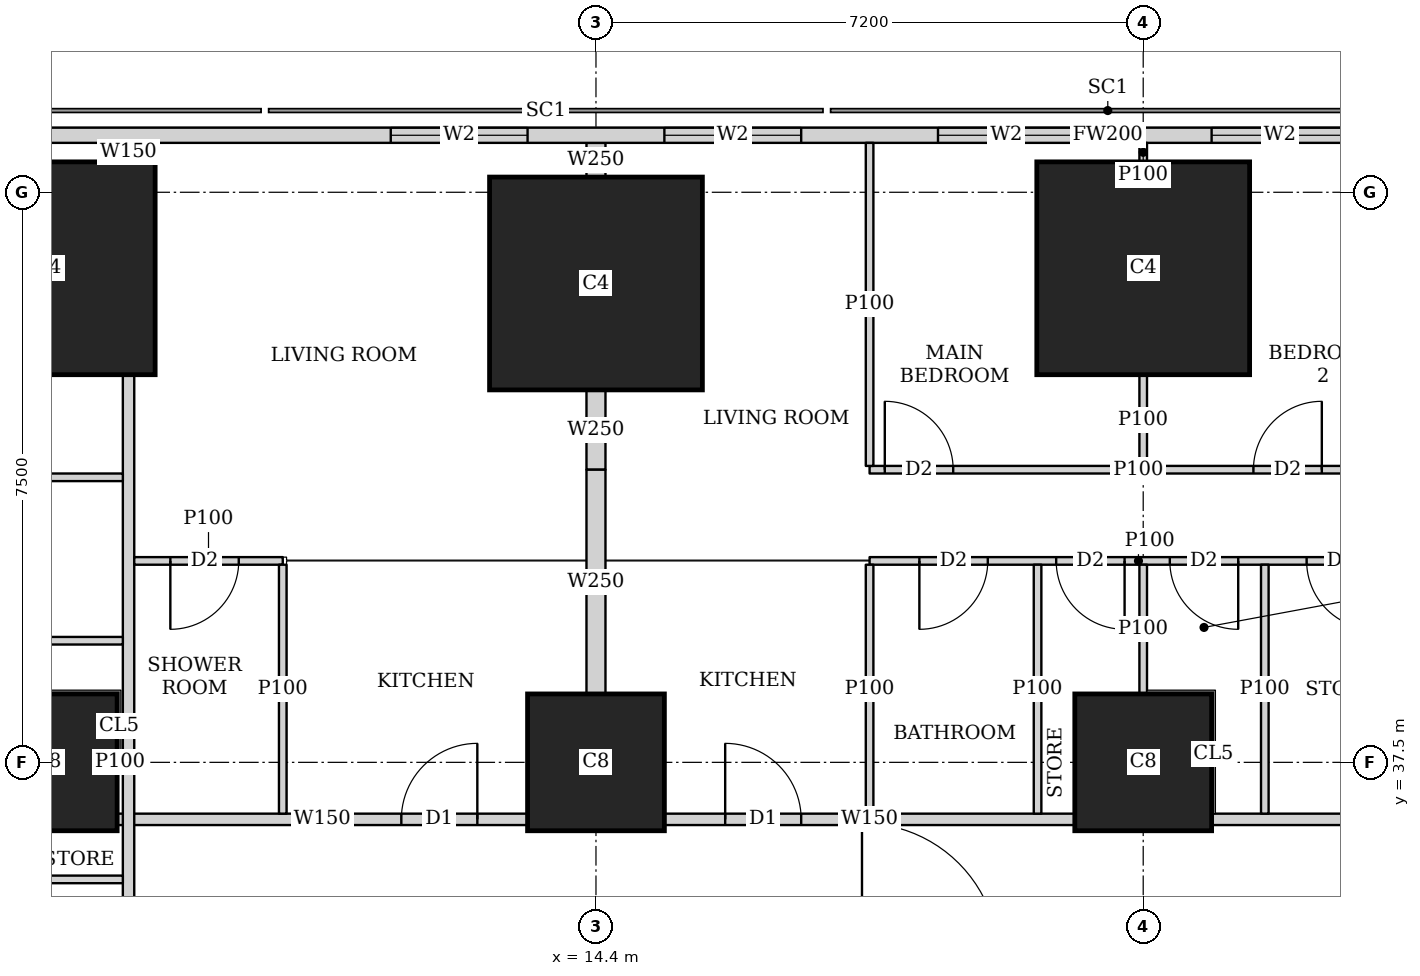
"""IFC4 building model, lengths in metres.
Left out: names, types, materials, properties, quantities, classifications, styles, units other than length and angle.
Written with IfcOpenShell. Run it as: python <this file> out.ifc"""

import sys

from ifc_helpers import new_model, si_unit, direction, frame, frame_2d, origin, origin_2d, place, context, subcontext, project, spatial, rectangle, extrude, element, fill, save


model = new_model("IFC4")
c1 = context("Model", 3, precision=1e-05, world=origin(), true_north=direction((0.0, 1.0)))
c2 = subcontext(c1, "Body", "Model", "MODEL_VIEW")
j1 = project(units=[si_unit("LENGTHUNIT", "METRE"), si_unit("PLANEANGLEUNIT", "RADIAN")], contexts=[c1])
p1 = place(None, origin())
s1 = spatial("IfcSite", under=j1, at=p1, CompositionType="ELEMENT")
p2 = place(p1, origin())
s2 = spatial("IfcBuilding", under=s1, at=p2, CompositionType="ELEMENT")
p3 = place(p2, frame((0.0, 0.0, 31.25)))
s3 = spatial("IfcBuildingStorey", under=s2, at=p3, CompositionType="ELEMENT", Elevation=31.25)
for number, where, z_axis, x_axis in (
    (1, (7.2, 37.5, 0.0), (0.0, 0.0, 1.0), (1.0, 0.0, 0.0)),
    (2, (14.4, 37.5, 0.0), (0.0, 0.0, 1.0), (1.0, 0.0, 0.0)),
    (3, (21.6, 37.5, 0.0), (0.0, 0.0, 1.0), (1.0, 0.0, 0.0)),
):
    element("IfcColumn", number, at=place(p3, frame(where, z_axis=z_axis, x_axis=x_axis)), inside=s3, PredefinedType="COLUMN", context=c2, shape_type="SweptSolid", body=[
        extrude(rectangle(XDim=1.8, YDim=1.8, at=origin_2d()), origin(), (0.0, 0.0, 1.0), 3.75),
    ])
for number, where, z_axis, x_axis in (
    (4, (7.2, 44.0, 0.0), (0.0, 0.0, 1.0), (1.0, 0.0, 0.0)),
    (5, (14.4, 43.8, 0.0), (0.0, 0.0, 1.0), (1.0, 0.0, 0.0)),
    (6, (21.6, 44.0, 0.0), (0.0, 0.0, 1.0), (1.0, 0.0, 0.0)),
):
    element("IfcColumn", number, at=place(p3, frame(where, z_axis=z_axis, x_axis=x_axis)), inside=s3, PredefinedType="COLUMN", context=c2, shape_type="SweptSolid", body=[
        extrude(rectangle(XDim=2.8, YDim=2.8, at=origin_2d()), origin(), (0.0, 0.0, 1.0), 3.75),
    ])
p4 = place(p3, frame((40.106, 45.75, 0.0), z_axis=(0.0, 0.0, 1.0), x_axis=(-1.0, 0.0, 0.0)))
e7 = element("IfcWall", 7, at=p4, inside=s3, PredefinedType="SOLIDWALL", context=c2, shape_type="SweptSolid", body=[
    extrude(rectangle(XDim=37.943, YDim=0.2, at=frame_2d((18.971, 0.0))), origin(), (0.0, 0.0, 1.0), 3.5),
])
p5 = place(p4, frame((8.606, 0.0, 0.9)))
e8 = element("IfcOpeningElement", 8, at=p5, cuts=e7, PredefinedType="OPENING", context=c2, shape_type="SweptSolid", body=[
    extrude(rectangle(XDim=1.8, YDim=1.5, at=frame_2d((0.9, 0.75))), frame((0.0, 0.11, 0.0), z_axis=(0.0, -1.0, 0.0), x_axis=(1.0, 0.0, 0.0)), (0.0, 0.0, 1.0), 0.22),
])
p6 = place(p4, frame((12.206, 0.0, 0.9)))
e9 = element("IfcOpeningElement", 9, at=p6, cuts=e7, PredefinedType="OPENING", context=c2, shape_type="SweptSolid", body=[
    extrude(rectangle(XDim=1.8, YDim=1.5, at=frame_2d((0.9, 0.75))), frame((0.0, 0.11, 0.0), z_axis=(0.0, -1.0, 0.0), x_axis=(1.0, 0.0, 0.0)), (0.0, 0.0, 1.0), 0.22),
])
p7 = place(p4, frame((15.806, 0.0, 0.9)))
e10 = element("IfcOpeningElement", 10, at=p7, cuts=e7, PredefinedType="OPENING", context=c2, shape_type="SweptSolid", body=[
    extrude(rectangle(XDim=1.8, YDim=1.5, at=frame_2d((0.9, 0.75))), frame((0.0, 0.11, 0.0), z_axis=(0.0, -1.0, 0.0), x_axis=(1.0, 0.0, 0.0)), (0.0, 0.0, 1.0), 0.22),
])
p8 = place(p4, frame((19.406, 0.0, 0.9)))
e11 = element("IfcOpeningElement", 11, at=p8, cuts=e7, PredefinedType="OPENING", context=c2, shape_type="SweptSolid", body=[
    extrude(rectangle(XDim=1.8, YDim=1.5, at=frame_2d((0.9, 0.75))), frame((0.0, 0.11, 0.0), z_axis=(0.0, -1.0, 0.0), x_axis=(1.0, 0.0, 0.0)), (0.0, 0.0, 1.0), 0.22),
])
p9 = place(p4, frame((23.006, 0.0, 0.9)))
e12 = element("IfcOpeningElement", 12, at=p9, cuts=e7, PredefinedType="OPENING", context=c2, shape_type="SweptSolid", body=[
    extrude(rectangle(XDim=1.8, YDim=1.5, at=frame_2d((0.9, 0.75))), frame((0.0, 0.11, 0.0), z_axis=(0.0, -1.0, 0.0), x_axis=(1.0, 0.0, 0.0)), (0.0, 0.0, 1.0), 0.22),
])
p10 = place(p4, frame((26.606, 0.0, 0.9)))
e13 = element("IfcOpeningElement", 13, at=p10, cuts=e7, PredefinedType="OPENING", context=c2, shape_type="SweptSolid", body=[
    extrude(rectangle(XDim=1.8, YDim=1.5, at=frame_2d((0.9, 0.75))), frame((0.0, 0.11, 0.0), z_axis=(0.0, -1.0, 0.0), x_axis=(1.0, 0.0, 0.0)), (0.0, 0.0, 1.0), 0.22),
])
p11 = place(p3, frame((8.25, 2.426, 0.0), z_axis=(0.0, 0.0, 1.0), x_axis=(0.0, 1.0, 0.0)))
e14 = element("IfcWall", 14, at=p11, inside=s3, PredefinedType="SOLIDWALL", context=c2, shape_type="SweptSolid", body=[
    extrude(rectangle(XDim=40.173, YDim=0.15, at=frame_2d((20.086, 0.0))), origin(), (0.0, 0.0, 1.0), 3.5),
])
p12 = place(p11, frame((14.161, 0.0, 0.0)))
e15 = element("IfcOpeningElement", 15, at=p12, cuts=e14, PredefinedType="OPENING", context=c2, shape_type="SweptSolid", body=[
    extrude(rectangle(XDim=1.0, YDim=2.1, at=frame_2d((0.5, 1.05))), frame((0.0, 0.085, 0.0), z_axis=(0.0, -1.0, 0.0), x_axis=(1.0, 0.0, 0.0)), (0.0, 0.0, 1.0), 0.17),
])
p13 = place(p11, frame((17.487, 0.0, 0.0)))
e16 = element("IfcOpeningElement", 16, at=p13, cuts=e14, PredefinedType="OPENING", context=c2, shape_type="SweptSolid", body=[
    extrude(rectangle(XDim=1.0, YDim=2.1, at=frame_2d((0.5, 1.05))), frame((0.0, 0.085, 0.0), z_axis=(0.0, -1.0, 0.0), x_axis=(1.0, 0.0, 0.0)), (0.0, 0.0, 1.0), 0.17),
])
p14 = place(p11, frame((29.161, 0.0, 0.0)))
e17 = element("IfcOpeningElement", 17, at=p14, cuts=e14, PredefinedType="OPENING", context=c2, shape_type="SweptSolid", body=[
    extrude(rectangle(XDim=1.0, YDim=2.1, at=frame_2d((0.5, 1.05))), frame((0.0, 0.085, 0.0), z_axis=(0.0, -1.0, 0.0), x_axis=(1.0, 0.0, 0.0)), (0.0, 0.0, 1.0), 0.17),
])
p15 = place(p3, frame((8.25, 45.401, 0.0), z_axis=(0.0, 0.0, 1.0), x_axis=(0.0, 1.0, 0.0)))
e18 = element("IfcWall", 18, at=p15, inside=s3, PredefinedType="SOLIDWALL", context=c2, shape_type="SweptSolid", body=[
    extrude(rectangle(XDim=0.249, YDim=0.15, at=frame_2d((0.125, 0.0))), origin(), (0.0, 0.0, 1.0), 3.5),
])
p16 = place(p3, frame((8.1, 36.75, 0.0), z_axis=(0.0, 0.0, 1.0), x_axis=(1.0, 0.0, 0.0)))
e19 = element("IfcWall", 19, at=p16, inside=s3, PredefinedType="SOLIDWALL", context=c2, shape_type="SweptSolid", body=[
    extrude(rectangle(XDim=5.399, YDim=0.15, at=frame_2d((2.699, 0.0))), origin(), (0.0, 0.0, 1.0), 3.5),
])
p17 = place(p16, frame((3.739, 0.0, 0.0)))
e20 = element("IfcOpeningElement", 20, at=p17, cuts=e19, PredefinedType="OPENING", context=c2, shape_type="SweptSolid", body=[
    extrude(rectangle(XDim=1.0, YDim=2.1, at=frame_2d((0.5, 1.05))), frame((0.0, 0.085, 0.0), z_axis=(0.0, -1.0, 0.0), x_axis=(1.0, 0.0, 0.0)), (0.0, 0.0, 1.0), 0.17),
])
p18 = place(p3, frame((15.301, 36.75, 0.0), z_axis=(0.0, 0.0, 1.0), x_axis=(1.0, 0.0, 0.0)))
e21 = element("IfcWall", 21, at=p18, inside=s3, PredefinedType="SOLIDWALL", context=c2, shape_type="SweptSolid", body=[
    extrude(rectangle(XDim=5.398, YDim=0.15, at=frame_2d((2.699, 0.0))), origin(), (0.0, 0.0, 1.0), 3.5),
])
p19 = place(p18, frame((0.799, 0.0, 0.0)))
e22 = element("IfcOpeningElement", 22, at=p19, cuts=e21, PredefinedType="OPENING", context=c2, shape_type="SweptSolid", body=[
    extrude(rectangle(XDim=1.0, YDim=2.1, at=frame_2d((0.5, 1.05))), frame((0.0, 0.085, 0.0), z_axis=(0.0, -1.0, 0.0), x_axis=(1.0, 0.0, 0.0)), (0.0, 0.0, 1.0), 0.17),
])
p20 = place(p3, frame((22.501, 36.75, 0.0), z_axis=(0.0, 0.0, 1.0), x_axis=(1.0, 0.0, 0.0)))
e23 = element("IfcWall", 23, at=p20, inside=s3, PredefinedType="SOLIDWALL", context=c2, shape_type="SweptSolid", body=[
    extrude(rectangle(XDim=5.398, YDim=0.15, at=frame_2d((2.699, 0.0))), origin(), (0.0, 0.0, 1.0), 3.5),
])
p21 = place(p20, frame((3.599, 0.0, 0.0)))
e24 = element("IfcOpeningElement", 24, at=p21, cuts=e23, PredefinedType="OPENING", context=c2, shape_type="SweptSolid", body=[
    extrude(rectangle(XDim=1.0, YDim=2.1, at=frame_2d((0.5, 1.05))), frame((0.0, 0.085, 0.0), z_axis=(0.0, -1.0, 0.0), x_axis=(1.0, 0.0, 0.0)), (0.0, 0.0, 1.0), 0.17),
])
p22 = place(p3, frame((8.101, 37.5, 0.0), z_axis=(0.0, 0.0, 1.0), x_axis=(1.0, 0.0, 0.0)))
e25 = element("IfcWall", 25, at=p22, inside=s3, PredefinedType="PARTITIONING", context=c2, shape_type="SweptSolid", body=[
    extrude(rectangle(XDim=0.074, YDim=0.1, at=frame_2d((0.037, 0.0))), origin(), (0.0, 0.0, 1.0), 3.5),
])
for number, where, z_axis, x_axis in (
    (26, (4.9, 41.25, 0.0), (0.0, 0.0, 1.0), (1.0, 0.0, 0.0)),
    (27, (4.9, 35.96, 0.0), (0.0, 0.0, 1.0), (1.0, 0.0, 0.0)),
    (28, (4.9, 39.1, 0.0), (0.0, 0.0, 1.0), (1.0, 0.0, 0.0)),
):
    element("IfcWall", number, at=place(p3, frame(where, z_axis=z_axis, x_axis=x_axis)), inside=s3, PredefinedType="PARTITIONING", context=c2, shape_type="SweptSolid", body=[
        extrude(rectangle(XDim=3.275, YDim=0.1, at=frame_2d((1.638, 0.0))), origin(), (0.0, 0.0, 1.0), 3.5),
    ])
p23 = place(p3, frame((8.325, 40.15, 0.0), z_axis=(0.0, 0.0, 1.0), x_axis=(1.0, 0.0, 0.0)))
e29 = element("IfcWall", 29, at=p23, inside=s3, PredefinedType="PARTITIONING", context=c2, shape_type="SweptSolid", body=[
    extrude(rectangle(XDim=1.954, YDim=0.1, at=frame_2d((0.977, 0.0))), origin(), (0.0, 0.0, 1.0), 3.5),
])
p24 = place(p23, frame((0.475, 0.0, 0.0)))
e30 = element("IfcOpeningElement", 30, at=p24, cuts=e29, PredefinedType="OPENING", context=c2, shape_type="SweptSolid", body=[
    extrude(rectangle(XDim=0.9, YDim=2.1, at=frame_2d((0.45, 1.05))), frame((0.0, 0.06, 0.0), z_axis=(0.0, -1.0, 0.0), x_axis=(1.0, 0.0, 0.0)), (0.0, 0.0, 1.0), 0.12),
])
p25 = place(p3, frame((10.279, 36.825, 0.0), z_axis=(0.0, 0.0, 1.0), x_axis=(0.0, 1.0, 0.0)))
e31 = element("IfcWall", 31, at=p25, inside=s3, PredefinedType="PARTITIONING", context=c2, shape_type="SweptSolid", body=[
    extrude(rectangle(XDim=3.275, YDim=0.1, at=frame_2d((1.638, 0.0))), origin(), (0.0, 0.0, 1.0), 3.5),
])
p26 = place(p3, frame((18.0, 41.35, 0.0), z_axis=(0.0, 0.0, 1.0), x_axis=(1.0, 0.0, 0.0)))
e32 = element("IfcWall", 32, at=p26, inside=s3, PredefinedType="PARTITIONING", context=c2, shape_type="SweptSolid", body=[
    extrude(rectangle(XDim=7.075, YDim=0.1, at=frame_2d((3.538, 0.0))), origin(), (0.0, 0.0, 1.0), 3.5),
])
p27 = place(p26, frame((0.2, 0.0, 0.0)))
e33 = element("IfcOpeningElement", 33, at=p27, cuts=e32, PredefinedType="OPENING", context=c2, shape_type="SweptSolid", body=[
    extrude(rectangle(XDim=0.9, YDim=2.1, at=frame_2d((0.45, 1.05))), frame((0.0, 0.06, 0.0), z_axis=(0.0, -1.0, 0.0), x_axis=(1.0, 0.0, 0.0)), (0.0, 0.0, 1.0), 0.12),
])
p28 = place(p26, frame((5.05, 0.0, 0.0)))
e34 = element("IfcOpeningElement", 34, at=p28, cuts=e32, PredefinedType="OPENING", context=c2, shape_type="SweptSolid", body=[
    extrude(rectangle(XDim=0.9, YDim=2.1, at=frame_2d((0.45, 1.05))), frame((0.0, 0.06, 0.0), z_axis=(0.0, -1.0, 0.0), x_axis=(1.0, 0.0, 0.0)), (0.0, 0.0, 1.0), 0.12),
])
p29 = place(p3, frame((18.0, 40.15, 0.0), z_axis=(0.0, 0.0, 1.0), x_axis=(1.0, 0.0, 0.0)))
e35 = element("IfcWall", 35, at=p29, inside=s3, PredefinedType="PARTITIONING", context=c2, shape_type="SweptSolid", body=[
    extrude(rectangle(XDim=7.075, YDim=0.1, at=frame_2d((3.538, 0.0))), origin(), (0.0, 0.0, 1.0), 3.5),
])
p30 = place(p29, frame((0.655, 0.0, 0.0)))
e36 = element("IfcOpeningElement", 36, at=p30, cuts=e35, PredefinedType="OPENING", context=c2, shape_type="SweptSolid", body=[
    extrude(rectangle(XDim=0.9, YDim=2.1, at=frame_2d((0.45, 1.05))), frame((0.0, 0.06, 0.0), z_axis=(0.0, -1.0, 0.0), x_axis=(1.0, 0.0, 0.0)), (0.0, 0.0, 1.0), 0.12),
])
p31 = place(p29, frame((3.95, 0.0, 0.0)))
e37 = element("IfcOpeningElement", 37, at=p31, cuts=e35, PredefinedType="OPENING", context=c2, shape_type="SweptSolid", body=[
    extrude(rectangle(XDim=0.9, YDim=2.1, at=frame_2d((0.45, 1.05))), frame((0.0, 0.06, 0.0), z_axis=(0.0, -1.0, 0.0), x_axis=(1.0, 0.0, 0.0)), (0.0, 0.0, 1.0), 0.12),
])
p32 = place(p29, frame((2.455, 0.0, 0.0)))
e38 = element("IfcOpeningElement", 38, at=p32, cuts=e35, PredefinedType="OPENING", context=c2, shape_type="SweptSolid", body=[
    extrude(rectangle(XDim=0.9, YDim=2.1, at=frame_2d((0.45, 1.05))), frame((0.0, 0.06, 0.0), z_axis=(0.0, -1.0, 0.0), x_axis=(1.0, 0.0, 0.0)), (0.0, 0.0, 1.0), 0.12),
])
p33 = place(p29, frame((5.75, 0.0, 0.0)))
e39 = element("IfcOpeningElement", 39, at=p33, cuts=e35, PredefinedType="OPENING", context=c2, shape_type="SweptSolid", body=[
    extrude(rectangle(XDim=0.9, YDim=2.1, at=frame_2d((0.45, 1.05))), frame((0.0, 0.06, 0.0), z_axis=(0.0, -1.0, 0.0), x_axis=(1.0, 0.0, 0.0)), (0.0, 0.0, 1.0), 0.12),
])
p34 = place(p3, frame((18.0, 41.4, 0.0), z_axis=(0.0, 0.0, 1.0), x_axis=(0.0, 1.0, 0.0)))
e40 = element("IfcWall", 40, at=p34, inside=s3, PredefinedType="PARTITIONING", context=c2, shape_type="SweptSolid", body=[
    extrude(rectangle(XDim=4.25, YDim=0.1, at=frame_2d((2.125, 0.0))), origin(), (0.0, 0.0, 1.0), 2.05),
])
p35 = place(p3, frame((21.6, 41.4, 0.0), z_axis=(0.0, 0.0, 1.0), x_axis=(0.0, 1.0, 0.0)))
e41 = element("IfcWall", 41, at=p35, inside=s3, PredefinedType="PARTITIONING", context=c2, shape_type="SweptSolid", body=[
    extrude(rectangle(XDim=1.199, YDim=0.1, at=frame_2d((0.6, 0.0))), origin(), (0.0, 0.0, 1.0), 3.5),
])
p36 = place(p3, frame((21.6, 45.401, 0.0), z_axis=(0.0, 0.0, 1.0), x_axis=(0.0, 1.0, 0.0)))
e42 = element("IfcWall", 42, at=p36, inside=s3, PredefinedType="PARTITIONING", context=c2, shape_type="SweptSolid", body=[
    extrude(rectangle(XDim=0.249, YDim=0.1, at=frame_2d((0.125, 0.0))), origin(), (0.0, 0.0, 1.0), 3.5),
])
p37 = place(p3, frame((18.0, 36.825, 0.0), z_axis=(0.0, 0.0, 1.0), x_axis=(0.0, 1.0, 0.0)))
e43 = element("IfcWall", 43, at=p37, inside=s3, PredefinedType="PARTITIONING", context=c2, shape_type="SweptSolid", body=[
    extrude(rectangle(XDim=3.275, YDim=0.1, at=frame_2d((1.638, 0.0))), origin(), (0.0, 0.0, 1.0), 3.5),
])
p38 = place(p3, frame((21.6, 38.401, 0.0), z_axis=(0.0, 0.0, 1.0), x_axis=(0.0, 1.0, 0.0)))
e44 = element("IfcWall", 44, at=p38, inside=s3, PredefinedType="PARTITIONING", context=c2, shape_type="SweptSolid", body=[
    extrude(rectangle(XDim=1.699, YDim=0.1, at=frame_2d((0.85, 0.0))), origin(), (0.0, 0.0, 1.0), 3.5),
])
for number, where, z_axis, x_axis in (
    (45, (20.21, 36.825, 0.0), (0.0, 0.0, 1.0), (0.0, 1.0, 0.0)),
    (46, (23.2, 36.825, 0.0), (0.0, 0.0, 1.0), (0.0, 1.0, 0.0)),
):
    element("IfcWall", number, at=place(p3, frame(where, z_axis=z_axis, x_axis=x_axis)), inside=s3, PredefinedType="PARTITIONING", context=c2, shape_type="SweptSolid", body=[
        extrude(rectangle(XDim=3.275, YDim=0.1, at=frame_2d((1.638, 0.0))), origin(), (0.0, 0.0, 1.0), 3.5),
    ])
p39 = place(p3, frame((14.4, 41.35, 0.0), z_axis=(0.0, 0.0, 1.0), x_axis=(0.0, 1.0, 0.0)))
e47 = element("IfcWall", 47, at=p39, inside=s3, PredefinedType="SOLIDWALL", context=c2, shape_type="SweptSolid", body=[
    extrude(rectangle(XDim=1.049, YDim=0.25, at=frame_2d((0.524, 0.0))), origin(), (0.0, 0.0, 1.0), 3.5),
])
p40 = place(p3, frame((14.4, 45.201, 0.0), z_axis=(0.0, 0.0, 1.0), x_axis=(0.0, 1.0, 0.0)))
e48 = element("IfcWall", 48, at=p40, inside=s3, PredefinedType="SOLIDWALL", context=c2, shape_type="SweptSolid", body=[
    extrude(rectangle(XDim=0.449, YDim=0.25, at=frame_2d((0.225, 0.0))), origin(), (0.0, 0.0, 1.0), 3.5),
])
p41 = place(p3, frame((14.4, 38.401, 0.0), z_axis=(0.0, 0.0, 1.0), x_axis=(0.0, 1.0, 0.0)))
e49 = element("IfcWall", 49, at=p41, inside=s3, PredefinedType="SOLIDWALL", context=c2, shape_type="SweptSolid", body=[
    extrude(rectangle(XDim=2.949, YDim=0.25, at=frame_2d((1.475, 0.0))), origin(), (0.0, 0.0, 1.0), 3.5),
])
p42 = place(p7, origin())
e50 = element("IfcWindow", 50, at=p42, inside=s3, PartitioningType="SINGLE_PANEL", PredefinedType="WINDOW", context=c2, shape_type="SweptSolid", body=[
    extrude(rectangle(XDim=1.8, YDim=1.5, at=frame_2d((0.9, 0.75))), frame((0.0, 0.03, 0.0), z_axis=(0.0, -1.0, 0.0), x_axis=(1.0, 0.0, 0.0)), (0.0, 0.0, 1.0), 0.06),
])
fill(e10, e50)
p43 = place(p8, origin())
e51 = element("IfcWindow", 51, at=p43, inside=s3, PartitioningType="SINGLE_PANEL", PredefinedType="WINDOW", context=c2, shape_type="SweptSolid", body=[
    extrude(rectangle(XDim=1.8, YDim=1.5, at=frame_2d((0.9, 0.75))), frame((0.0, 0.03, 0.0), z_axis=(0.0, -1.0, 0.0), x_axis=(1.0, 0.0, 0.0)), (0.0, 0.0, 1.0), 0.06),
])
fill(e11, e51)
p44 = place(p9, origin())
e52 = element("IfcWindow", 52, at=p44, inside=s3, PartitioningType="SINGLE_PANEL", PredefinedType="WINDOW", context=c2, shape_type="SweptSolid", body=[
    extrude(rectangle(XDim=1.8, YDim=1.5, at=frame_2d((0.9, 0.75))), frame((0.0, 0.03, 0.0), z_axis=(0.0, -1.0, 0.0), x_axis=(1.0, 0.0, 0.0)), (0.0, 0.0, 1.0), 0.06),
])
fill(e12, e52)
p45 = place(p10, origin())
e53 = element("IfcWindow", 53, at=p45, inside=s3, PartitioningType="SINGLE_PANEL", PredefinedType="WINDOW", context=c2, shape_type="SweptSolid", body=[
    extrude(rectangle(XDim=1.8, YDim=1.5, at=frame_2d((0.9, 0.75))), frame((0.0, 0.03, 0.0), z_axis=(0.0, -1.0, 0.0), x_axis=(1.0, 0.0, 0.0)), (0.0, 0.0, 1.0), 0.06),
])
fill(e13, e53)
p46 = place(p24, origin())
e54 = element("IfcDoor", 54, at=p46, inside=s3, OperationType="SINGLE_SWING_RIGHT", PredefinedType="DOOR", context=c2, shape_type="SweptSolid", body=[
    extrude(rectangle(XDim=0.9, YDim=2.1, at=frame_2d((0.45, 1.05))), frame((0.0, 0.025, 0.0), z_axis=(0.0, -1.0, 0.0), x_axis=(1.0, 0.0, 0.0)), (0.0, 0.0, 1.0), 0.05),
])
fill(e30, e54)
p47 = place(p17, origin())
e55 = element("IfcDoor", 55, at=p47, inside=s3, OperationType="SINGLE_SWING_RIGHT", PredefinedType="DOOR", context=c2, shape_type="SweptSolid", body=[
    extrude(rectangle(XDim=1.0, YDim=2.1, at=frame_2d((0.5, 1.05))), frame((0.0, 0.025, 0.0), z_axis=(0.0, -1.0, 0.0), x_axis=(1.0, 0.0, 0.0)), (0.0, 0.0, 1.0), 0.05),
])
fill(e20, e55)
p48 = place(p27, origin())
e56 = element("IfcDoor", 56, at=p48, inside=s3, OperationType="SINGLE_SWING_LEFT", PredefinedType="DOOR", context=c2, shape_type="SweptSolid", body=[
    extrude(rectangle(XDim=0.9, YDim=2.1, at=frame_2d((0.45, 1.05))), frame((0.0, 0.025, 0.0), z_axis=(0.0, -1.0, 0.0), x_axis=(1.0, 0.0, 0.0)), (0.0, 0.0, 1.0), 0.05),
])
fill(e33, e56)
p49 = place(p28, origin())
e57 = element("IfcDoor", 57, at=p49, inside=s3, OperationType="SINGLE_SWING_RIGHT", PredefinedType="DOOR", context=c2, shape_type="SweptSolid", body=[
    extrude(rectangle(XDim=0.9, YDim=2.1, at=frame_2d((0.45, 1.05))), frame((0.0, 0.025, 0.0), z_axis=(0.0, -1.0, 0.0), x_axis=(1.0, 0.0, 0.0)), (0.0, 0.0, 1.0), 0.05),
])
fill(e34, e57)
p50 = place(p30, origin())
e58 = element("IfcDoor", 58, at=p50, inside=s3, OperationType="SINGLE_SWING_RIGHT", PredefinedType="DOOR", context=c2, shape_type="SweptSolid", body=[
    extrude(rectangle(XDim=0.9, YDim=2.1, at=frame_2d((0.45, 1.05))), frame((0.0, 0.025, 0.0), z_axis=(0.0, -1.0, 0.0), x_axis=(1.0, 0.0, 0.0)), (0.0, 0.0, 1.0), 0.05),
])
fill(e36, e58)
p51 = place(p31, origin())
e59 = element("IfcDoor", 59, at=p51, inside=s3, OperationType="SINGLE_SWING_LEFT", PredefinedType="DOOR", context=c2, shape_type="SweptSolid", body=[
    extrude(rectangle(XDim=0.9, YDim=2.1, at=frame_2d((0.45, 1.05))), frame((0.0, 0.025, 0.0), z_axis=(0.0, -1.0, 0.0), x_axis=(1.0, 0.0, 0.0)), (0.0, 0.0, 1.0), 0.05),
])
fill(e37, e59)
p52 = place(p32, origin())
e60 = element("IfcDoor", 60, at=p52, inside=s3, OperationType="SINGLE_SWING_LEFT", PredefinedType="DOOR", context=c2, shape_type="SweptSolid", body=[
    extrude(rectangle(XDim=0.9, YDim=2.1, at=frame_2d((0.45, 1.05))), frame((0.0, 0.025, 0.0), z_axis=(0.0, -1.0, 0.0), x_axis=(1.0, 0.0, 0.0)), (0.0, 0.0, 1.0), 0.05),
])
fill(e38, e60)
p53 = place(p33, origin())
e61 = element("IfcDoor", 61, at=p53, inside=s3, OperationType="SINGLE_SWING_LEFT", PredefinedType="DOOR", context=c2, shape_type="SweptSolid", body=[
    extrude(rectangle(XDim=0.9, YDim=2.1, at=frame_2d((0.45, 1.05))), frame((0.0, 0.025, 0.0), z_axis=(0.0, -1.0, 0.0), x_axis=(1.0, 0.0, 0.0)), (0.0, 0.0, 1.0), 0.05),
])
fill(e39, e61)
p54 = place(p19, origin())
e62 = element("IfcDoor", 62, at=p54, inside=s3, OperationType="SINGLE_SWING_LEFT", PredefinedType="DOOR", context=c2, shape_type="SweptSolid", body=[
    extrude(rectangle(XDim=1.0, YDim=2.1, at=frame_2d((0.5, 1.05))), frame((0.0, 0.025, 0.0), z_axis=(0.0, -1.0, 0.0), x_axis=(1.0, 0.0, 0.0)), (0.0, 0.0, 1.0), 0.05),
])
fill(e22, e62)
save(model, sys.argv[1])
